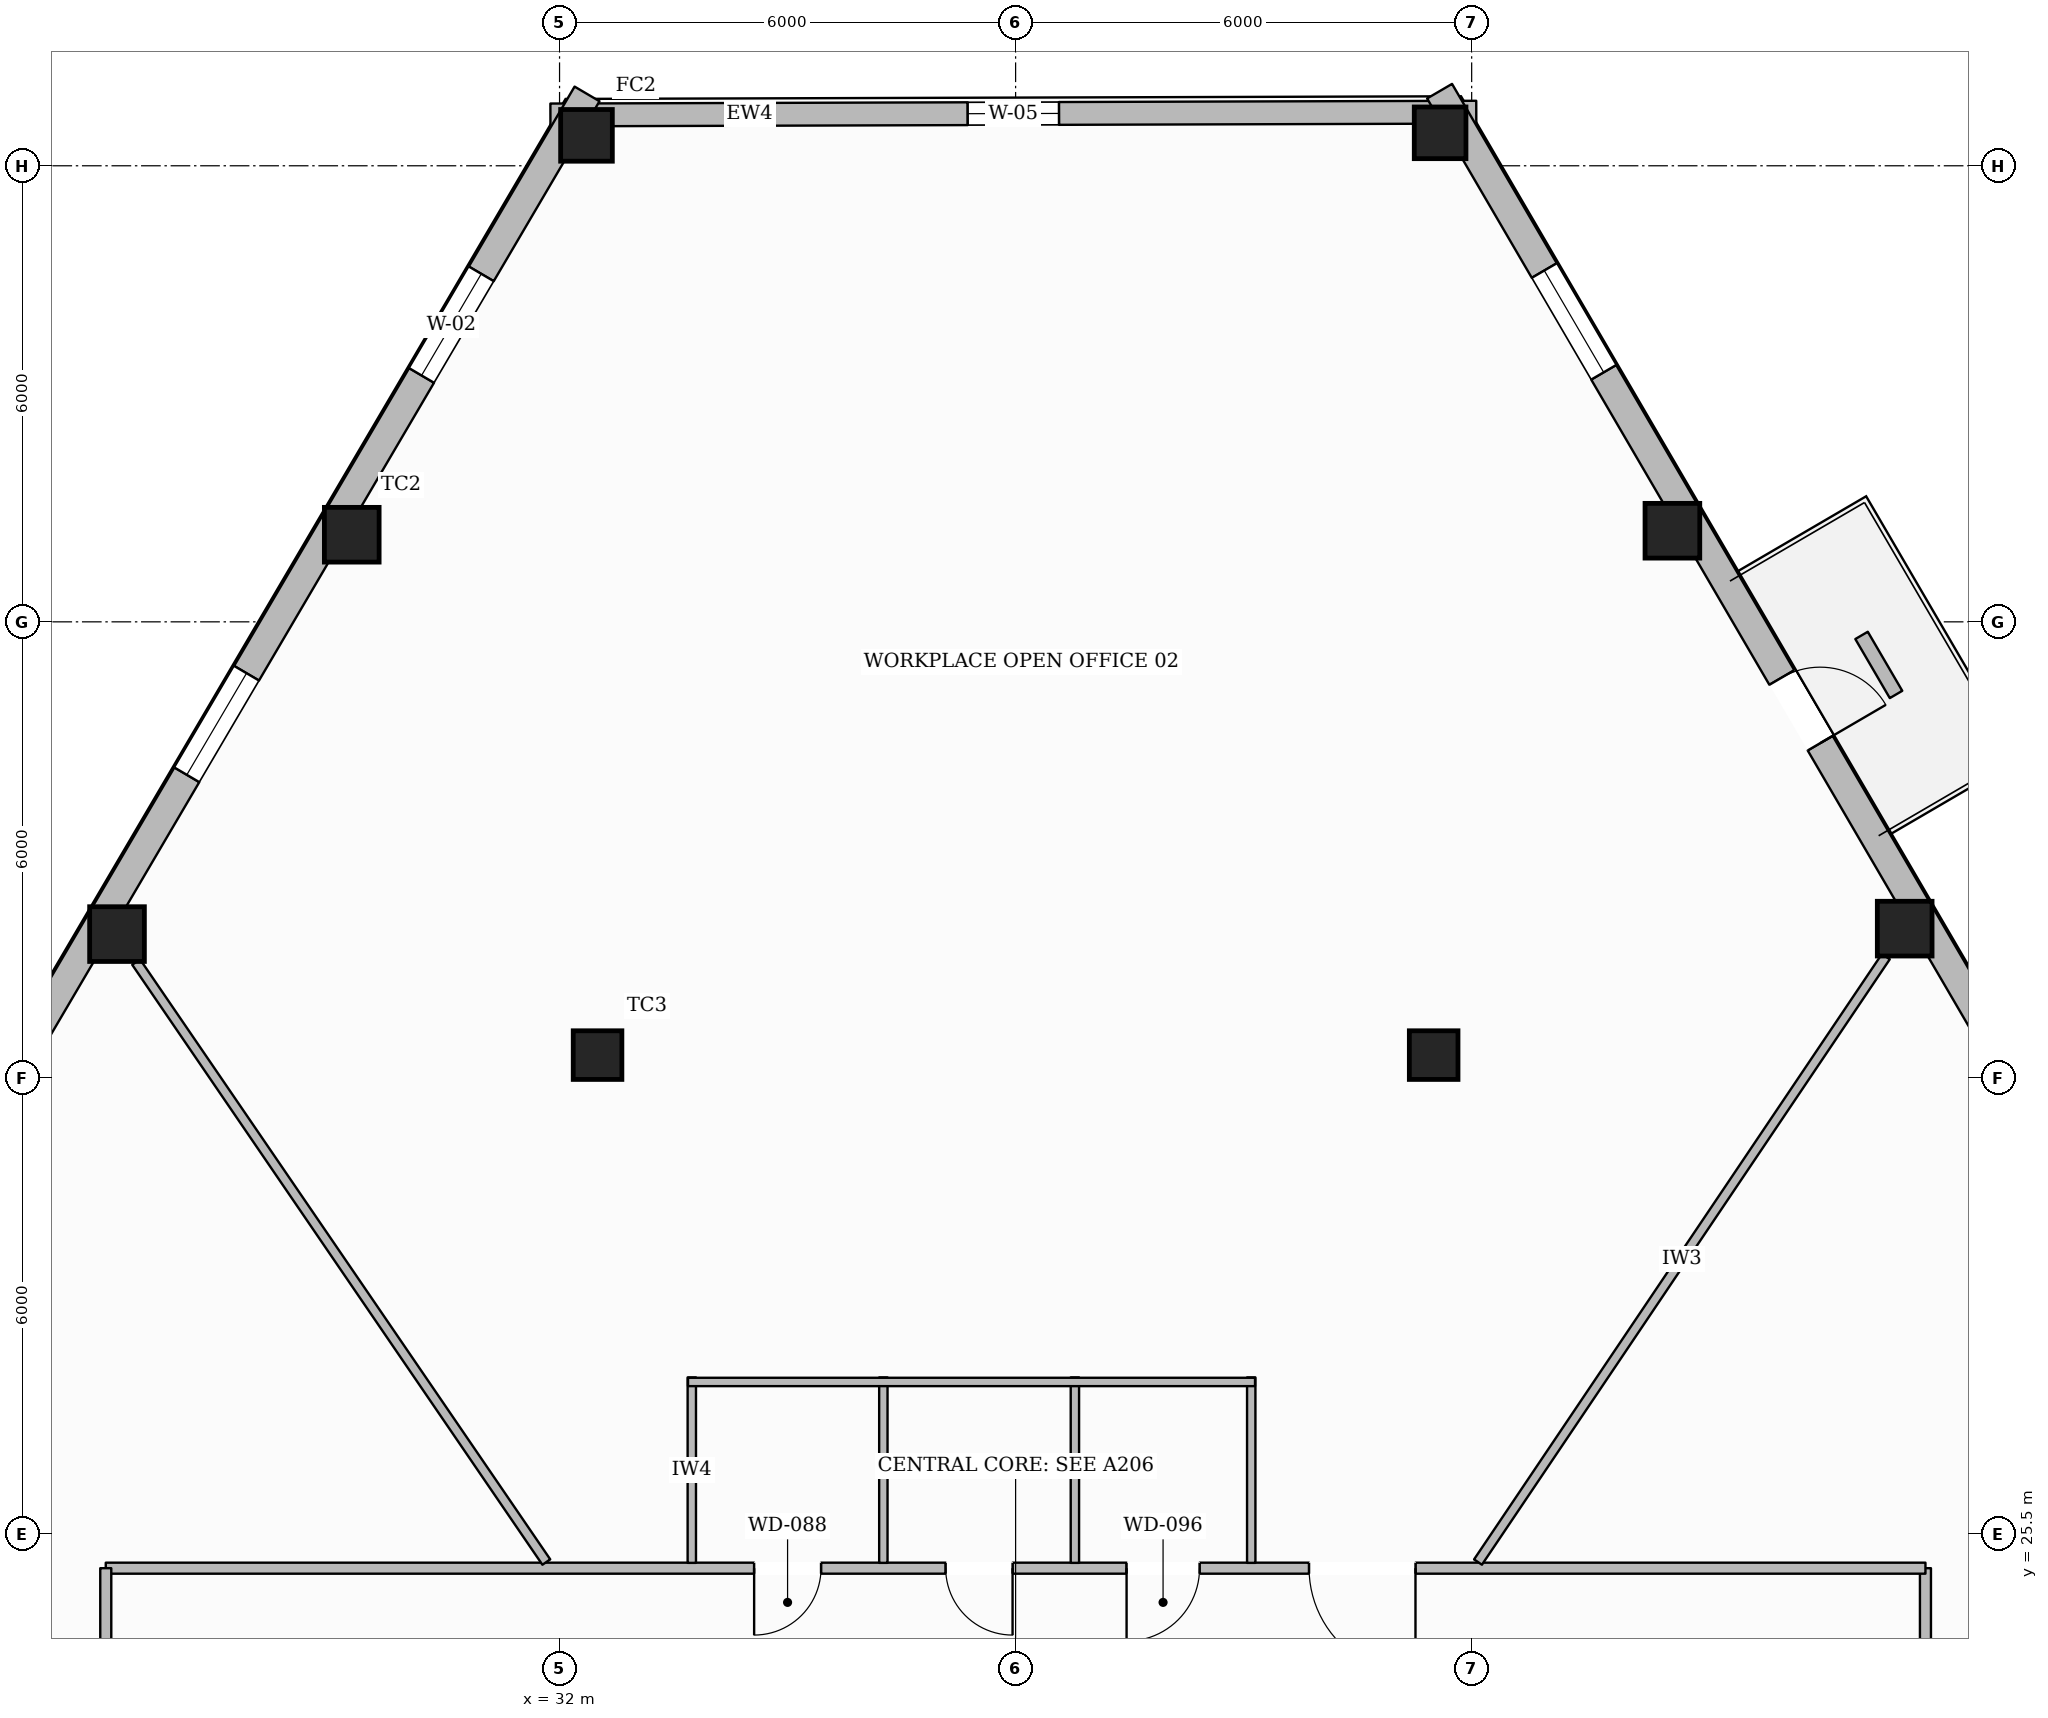
"""IFC4 building model, lengths in metres.
Left out: names, types, materials, properties, quantities, classifications, styles, units other than length and angle.
Written with IfcOpenShell. Run it as: python <this file> out.ifc"""

import sys

from ifc_helpers import new_model, si_unit, direction, frame, frame_2d, origin, origin_2d, place, context, subcontext, project, spatial, rectangle, hollow_rectangle, extrude, element, fill, save


model = new_model("IFC4")
c1 = context("Model", 3, precision=1e-05, world=origin(), true_north=direction((0.0, 1.0)))
c2 = subcontext(c1, "Body", "Model", "MODEL_VIEW")
j1 = project(units=[si_unit("LENGTHUNIT", "METRE"), si_unit("PLANEANGLEUNIT", "RADIAN")], contexts=[c1])
p1 = place(None, origin())
s1 = spatial("IfcSite", under=j1, at=p1, CompositionType="ELEMENT")
p2 = place(p1, origin())
s2 = spatial("IfcBuilding", under=s1, at=p2, CompositionType="ELEMENT")
p3 = place(p2, frame((0.0, 0.0, 135.55)))
s3 = spatial("IfcBuildingStorey", under=s2, at=p3, CompositionType="ELEMENT", Elevation=135.55)
p4 = place(p3, frame((32.354, 43.9, 0.0), z_axis=(0.0, 0.0, 1.0), x_axis=(1.0, 0.0, 0.0)))
e1 = element("IfcColumn", 1, at=p4, inside=s3, PredefinedType="COLUMN", context=c2, shape_type="SweptSolid", body=[
    extrude(hollow_rectangle(XDim=0.68, YDim=0.68, WallThickness=0.03, at=origin_2d()), origin(), (0.0, 0.0, 1.0), 3.6),
])
for number, where, z_axis, x_axis in (
    (2, (29.266, 38.646, 0.0), (0.0, 0.0, 1.0), (1.0, 0.0, 0.0)),
    (3, (26.178, 33.392, 0.0), (0.0, 0.0, 1.0), (1.0, 0.0, 0.0)),
    (4, (49.697, 33.464, 0.0), (0.0, 0.0, 1.0), (1.0, 0.0, 0.0)),
    (5, (46.641, 38.698, 0.0), (0.0, 0.0, 1.0), (1.0, 0.0, 0.0)),
):
    element("IfcColumn", number, at=place(p3, frame(where, z_axis=z_axis, x_axis=x_axis)), inside=s3, PredefinedType="COLUMN", context=c2, shape_type="SweptSolid", body=[
        extrude(hollow_rectangle(XDim=0.72, YDim=0.72, WallThickness=0.032, at=origin_2d()), origin(), (0.0, 0.0, 1.0), 3.6),
    ])
p5 = place(p3, frame((43.585, 43.934, 0.0), z_axis=(0.0, 0.0, 1.0), x_axis=(1.0, 0.0, 0.0)))
e6 = element("IfcColumn", 6, at=p5, inside=s3, PredefinedType="COLUMN", context=c2, shape_type="SweptSolid", body=[
    extrude(hollow_rectangle(XDim=0.68, YDim=0.68, WallThickness=0.03, at=origin_2d()), origin(), (0.0, 0.0, 1.0), 3.6),
])
for number, where, z_axis, x_axis in (
    (7, (32.5, 31.8, 0.0), (0.0, 0.0, 1.0), (1.0, 0.0, 0.0)),
    (8, (43.5, 31.8, 0.0), (0.0, 0.0, 1.0), (1.0, 0.0, 0.0)),
):
    element("IfcColumn", number, at=place(p3, frame(where, z_axis=z_axis, x_axis=x_axis)), inside=s3, PredefinedType="COLUMN", context=c2, shape_type="SweptSolid", body=[
        extrude(hollow_rectangle(XDim=0.64, YDim=0.64, WallThickness=0.028, at=origin_2d()), origin(), (0.0, 0.0, 1.0), 3.6),
    ])
p6 = place(p3, frame((31.88, 44.169, 0.0), z_axis=(0.0, 0.0, 1.0), x_axis=(0.999995540586, 0.002986437416, 0.0)))
e9 = element("IfcWall", 9, at=p6, inside=s3, PredefinedType="STANDARD", context=c2, shape_type="SweptSolid", body=[
    extrude(rectangle(XDim=12.181, YDim=0.3, at=frame_2d((6.09, 0.0))), origin(), (0.0, 0.0, 1.0), 3.059),
])
p7 = place(p6, frame((5.49, 0.0, 0.65)))
e10 = element("IfcOpeningElement", 10, at=p7, cuts=e9, PredefinedType="OPENING", context=c2, shape_type="SweptSolid", body=[
    extrude(rectangle(XDim=1.2, YDim=1.7, at=frame_2d((0.6, 0.85))), frame((0.0, 0.16, 0.0), z_axis=(0.0, -1.0, 0.0), x_axis=(1.0, 0.0, 0.0)), (0.0, 0.0, 1.0), 0.32),
])
p8 = place(p3, frame((13.349, 12.098, 0.0), z_axis=(0.0, 0.0, 1.0), x_axis=(0.506726076083, 0.862107118528, 0.0)))
e11 = element("IfcWall", 11, at=p8, inside=s3, PredefinedType="STANDARD", context=c2, shape_type="SweptSolid", body=[
    extrude(rectangle(XDim=37.522, YDim=0.38, at=frame_2d((18.761, 0.0))), origin(), (0.0, 0.0, 1.0), 3.059),
])
p9 = place(p8, frame((33.226, 0.0, 0.65)))
e12 = element("IfcOpeningElement", 12, at=p9, cuts=e11, PredefinedType="OPENING", context=c2, shape_type="SweptSolid", body=[
    extrude(rectangle(XDim=1.55, YDim=1.75, at=frame_2d((0.775, 0.875))), frame((0.0, 0.2, 0.0), z_axis=(0.0, -1.0, 0.0), x_axis=(1.0, 0.0, 0.0)), (0.0, 0.0, 1.0), 0.4),
])
p10 = place(p8, frame((27.131, 0.0, 0.65)))
e13 = element("IfcOpeningElement", 13, at=p10, cuts=e11, PredefinedType="OPENING", context=c2, shape_type="SweptSolid", body=[
    extrude(rectangle(XDim=1.55, YDim=1.75, at=frame_2d((0.775, 0.875))), frame((0.0, 0.2, 0.0), z_axis=(0.0, -1.0, 0.0), x_axis=(1.0, 0.0, 0.0)), (0.0, 0.0, 1.0), 0.4),
])
p11 = place(p8, frame((21.037, 0.0, 0.65)))
e14 = element("IfcOpeningElement", 14, at=p11, cuts=e11, PredefinedType="OPENING", context=c2, shape_type="SweptSolid", body=[
    extrude(rectangle(XDim=1.55, YDim=1.75, at=frame_2d((0.775, 0.875))), frame((0.0, 0.2, 0.0), z_axis=(0.0, -1.0, 0.0), x_axis=(1.0, 0.0, 0.0)), (0.0, 0.0, 1.0), 0.4),
])
p12 = place(p8, frame((8.848, 0.0, 0.65)))
e15 = element("IfcOpeningElement", 15, at=p12, cuts=e11, PredefinedType="OPENING", context=c2, shape_type="SweptSolid", body=[
    extrude(rectangle(XDim=1.55, YDim=1.75, at=frame_2d((0.775, 0.875))), frame((0.0, 0.2, 0.0), z_axis=(0.0, -1.0, 0.0), x_axis=(1.0, 0.0, 0.0)), (0.0, 0.0, 1.0), 0.4),
])
p13 = place(p8, frame((2.753, 0.0, 0.65)))
e16 = element("IfcOpeningElement", 16, at=p13, cuts=e11, PredefinedType="OPENING", context=c2, shape_type="SweptSolid", body=[
    extrude(rectangle(XDim=1.55, YDim=1.75, at=frame_2d((0.775, 0.875))), frame((0.0, 0.2, 0.0), z_axis=(0.0, -1.0, 0.0), x_axis=(1.0, 0.0, 0.0)), (0.0, 0.0, 1.0), 0.4),
])
p14 = place(p3, frame((43.578, 44.481, 0.0), z_axis=(0.0, 0.0, 1.0), x_axis=(0.504151594759, -0.863615174428, 0.0)))
e17 = element("IfcWall", 17, at=p14, inside=s3, PredefinedType="STANDARD", context=c2, shape_type="SweptSolid", body=[
    extrude(rectangle(XDim=37.328, YDim=0.38, at=frame_2d((18.664, 0.0))), origin(), (0.0, 0.0, 1.0), 3.059),
])
p15 = place(p14, frame((8.932, 0.0, 0.0)))
e18 = element("IfcOpeningElement", 18, at=p15, cuts=e17, PredefinedType="OPENING", context=c2, shape_type="SweptSolid", body=[
    extrude(rectangle(XDim=1.0, YDim=2.2, at=frame_2d((0.5, 1.1))), frame((0.0, 0.2, 0.0), z_axis=(0.0, -1.0, 0.0), x_axis=(1.0, 0.0, 0.0)), (0.0, 0.0, 1.0), 0.4),
])
p16 = place(p14, frame((33.041, 0.0, 0.65)))
e19 = element("IfcOpeningElement", 19, at=p16, cuts=e17, PredefinedType="OPENING", context=c2, shape_type="SweptSolid", body=[
    extrude(rectangle(XDim=1.55, YDim=1.75, at=frame_2d((0.775, 0.875))), frame((0.0, 0.2, 0.0), z_axis=(0.0, -1.0, 0.0), x_axis=(1.0, 0.0, 0.0)), (0.0, 0.0, 1.0), 0.4),
])
p17 = place(p14, frame((26.979, 0.0, 0.65)))
e20 = element("IfcOpeningElement", 20, at=p17, cuts=e17, PredefinedType="OPENING", context=c2, shape_type="SweptSolid", body=[
    extrude(rectangle(XDim=1.55, YDim=1.75, at=frame_2d((0.775, 0.875))), frame((0.0, 0.2, 0.0), z_axis=(0.0, -1.0, 0.0), x_axis=(1.0, 0.0, 0.0)), (0.0, 0.0, 1.0), 0.4),
])
p18 = place(p14, frame((20.917, 0.0, 0.65)))
e21 = element("IfcOpeningElement", 21, at=p18, cuts=e17, PredefinedType="OPENING", context=c2, shape_type="SweptSolid", body=[
    extrude(rectangle(XDim=1.55, YDim=1.75, at=frame_2d((0.775, 0.875))), frame((0.0, 0.2, 0.0), z_axis=(0.0, -1.0, 0.0), x_axis=(1.0, 0.0, 0.0)), (0.0, 0.0, 1.0), 0.4),
])
p19 = place(p14, frame((2.732, 0.0, 0.65)))
e22 = element("IfcOpeningElement", 22, at=p19, cuts=e17, PredefinedType="OPENING", context=c2, shape_type="SweptSolid", body=[
    extrude(rectangle(XDim=1.55, YDim=1.75, at=frame_2d((0.775, 0.875))), frame((0.0, 0.2, 0.0), z_axis=(0.0, -1.0, 0.0), x_axis=(1.0, 0.0, 0.0)), (0.0, 0.0, 1.0), 0.4),
])
p20 = place(p3, frame((49.583, 36.544, 0.0), z_axis=(0.0, 0.0, 1.0), x_axis=(-0.504208262385, 0.863582091143, 0.0)))
e23 = element("IfcWall", 23, at=p20, inside=s3, PredefinedType="USERDEFINED", context=c2, shape_type="SweptSolid", body=[
    extrude(rectangle(XDim=0.9, YDim=0.19, at=frame_2d((0.45, 0.0))), origin(), (0.0, 0.0, 1.0), 0.5),
])
p21 = place(p3, frame((49.97, 7.15, 0.0), z_axis=(0.0, 0.0, 1.0), x_axis=(0.0, 1.0, 0.0)))
e24 = element("IfcWall", 24, at=p21, inside=s3, PredefinedType="PARTITIONING", context=c2, shape_type="SweptSolid", body=[
    extrude(rectangle(XDim=17.9, YDim=0.145, at=frame_2d((8.95, 0.0))), origin(), (0.0, 0.0, 1.0), 3.288),
])
p22 = place(p21, frame((8.328, 0.0, 0.0)))
e25 = element("IfcOpeningElement", 25, at=p22, cuts=e24, PredefinedType="OPENING", context=c2, shape_type="SweptSolid", body=[
    extrude(rectangle(XDim=1.4, YDim=2.2, at=frame_2d((0.7, 1.1))), frame((0.0, 0.083, 0.0), z_axis=(0.0, -1.0, 0.0), x_axis=(1.0, 0.0, 0.0)), (0.0, 0.0, 1.0), 0.165),
])
p23 = place(p3, frame((49.97, 25.05, 0.0), z_axis=(0.0, 0.0, 1.0), x_axis=(-1.0, 0.0, 0.0)))
e26 = element("IfcWall", 26, at=p23, inside=s3, PredefinedType="PARTITIONING", context=c2, shape_type="SweptSolid", body=[
    extrude(rectangle(XDim=23.94, YDim=0.145, at=frame_2d((11.97, 0.0))), origin(), (0.0, 0.0, 1.0), 3.6),
])
p24 = place(p23, frame((14.53, 0.0, 0.0)))
e27 = element("IfcOpeningElement", 27, at=p24, cuts=e26, PredefinedType="OPENING", context=c2, shape_type="SweptSolid", body=[
    extrude(rectangle(XDim=0.88, YDim=2.1, at=frame_2d((0.44, 1.05))), frame((0.0, 0.083, 0.0), z_axis=(0.0, -1.0, 0.0), x_axis=(1.0, 0.0, 0.0)), (0.0, 0.0, 1.0), 0.165),
])
p25 = place(p23, frame((12.01, 0.0, 0.0)))
e28 = element("IfcOpeningElement", 28, at=p25, cuts=e26, PredefinedType="OPENING", context=c2, shape_type="SweptSolid", body=[
    extrude(rectangle(XDim=0.88, YDim=2.1, at=frame_2d((0.44, 1.05))), frame((0.0, 0.083, 0.0), z_axis=(0.0, -1.0, 0.0), x_axis=(1.0, 0.0, 0.0)), (0.0, 0.0, 1.0), 0.165),
])
p26 = place(p23, frame((9.55, 0.0, 0.0)))
e29 = element("IfcOpeningElement", 29, at=p26, cuts=e26, PredefinedType="OPENING", context=c2, shape_type="SweptSolid", body=[
    extrude(rectangle(XDim=0.96, YDim=2.1, at=frame_2d((0.48, 1.05))), frame((0.0, 0.083, 0.0), z_axis=(0.0, -1.0, 0.0), x_axis=(1.0, 0.0, 0.0)), (0.0, 0.0, 1.0), 0.165),
])
p27 = place(p23, frame((6.709, 0.0, 0.0)))
e30 = element("IfcOpeningElement", 30, at=p27, cuts=e26, PredefinedType="OPENING", context=c2, shape_type="SweptSolid", body=[
    extrude(rectangle(XDim=1.4, YDim=2.2, at=frame_2d((0.7, 1.1))), frame((0.0, 0.083, 0.0), z_axis=(0.0, -1.0, 0.0), x_axis=(1.0, 0.0, 0.0)), (0.0, 0.0, 1.0), 0.165),
])
p28 = place(p3, frame((26.03, 25.05, 0.0), z_axis=(0.0, 0.0, 1.0), x_axis=(0.0, -1.0, 0.0)))
e31 = element("IfcWall", 31, at=p28, inside=s3, PredefinedType="PARTITIONING", context=c2, shape_type="SweptSolid", body=[
    extrude(rectangle(XDim=17.9, YDim=0.145, at=frame_2d((8.95, 0.0))), origin(), (0.0, 0.0, 1.0), 3.288),
])
p29 = place(p28, frame((4.789, 0.0, 0.0)))
e32 = element("IfcOpeningElement", 32, at=p29, cuts=e31, PredefinedType="OPENING", context=c2, shape_type="SweptSolid", body=[
    extrude(rectangle(XDim=1.4, YDim=2.2, at=frame_2d((0.7, 1.1))), frame((0.0, 0.083, 0.0), z_axis=(0.0, -1.0, 0.0), x_axis=(1.0, 0.0, 0.0)), (0.0, 0.0, 1.0), 0.165),
])
for number, where, z_axis, x_axis in (
    (33, (33.74, 25.12, 0.0), (0.0, 0.0, 1.0), (0.0, 1.0, 0.0)),
    (34, (36.26, 25.12, 0.0), (0.0, 0.0, 1.0), (0.0, 1.0, 0.0)),
    (35, (38.78, 25.12, 0.0), (0.0, 0.0, 1.0), (0.0, 1.0, 0.0)),
    (36, (41.1, 25.12, 0.0), (0.0, 0.0, 1.0), (0.0, 1.0, 0.0)),
):
    element("IfcWall", number, at=place(p3, frame(where, z_axis=z_axis, x_axis=x_axis)), inside=s3, PredefinedType="PLUMBINGWALL", context=c2, shape_type="SweptSolid", body=[
        extrude(rectangle(XDim=2.44, YDim=0.11, at=frame_2d((1.22, 0.0))), origin(), (0.0, 0.0, 1.0), 3.6),
    ])
p30 = place(p3, frame((33.69, 27.5, 0.0), z_axis=(0.0, 0.0, 1.0), x_axis=(1.0, 0.0, 0.0)))
e37 = element("IfcWall", 37, at=p30, inside=s3, PredefinedType="PLUMBINGWALL", context=c2, shape_type="SweptSolid", body=[
    extrude(rectangle(XDim=7.46, YDim=0.11, at=frame_2d((3.73, 0.0))), origin(), (0.0, 0.0, 1.0), 3.6),
])
p31 = place(p3, frame((44.083, 25.131, 0.0), z_axis=(0.0, 0.0, 1.0), x_axis=(0.558706378993, 0.829365529832, 0.0)))
e38 = element("IfcWall", 38, at=p31, inside=s3, PredefinedType="PARTITIONING", context=c2, shape_type="SweptSolid", body=[
    extrude(rectangle(XDim=9.604, YDim=0.125, at=frame_2d((4.802, 0.0))), origin(), (0.0, 0.0, 1.0), 3.6),
])
p32 = place(p3, frame((31.826, 25.131, 0.0), z_axis=(0.0, 0.0, 1.0), x_axis=(-0.564384562589, 0.825512002039, 0.0)))
e39 = element("IfcWall", 39, at=p32, inside=s3, PredefinedType="PARTITIONING", context=c2, shape_type="SweptSolid", body=[
    extrude(rectangle(XDim=9.562, YDim=0.125, at=frame_2d((4.781, 0.0))), origin(), (0.0, 0.0, 1.0), 3.6),
])
p33 = place(p15, origin())
e40 = element("IfcDoor", 40, at=p33, inside=s3, OperationType="SINGLE_SWING_RIGHT", PredefinedType="DOOR", context=c2, shape_type="SweptSolid", body=[
    extrude(rectangle(XDim=1.0, YDim=2.2, at=frame_2d((0.5, 1.1))), frame((0.0, 0.025, 0.0), z_axis=(0.0, -1.0, 0.0), x_axis=(1.0, 0.0, 0.0)), (0.0, 0.0, 1.0), 0.05),
])
fill(e18, e40)
p34 = place(p9, origin())
e41 = element("IfcWindow", 41, at=p34, inside=s3, PartitioningType="SINGLE_PANEL", PredefinedType="WINDOW", context=c2, shape_type="SweptSolid", body=[
    extrude(rectangle(XDim=1.55, YDim=1.75, at=frame_2d((0.775, 0.875))), frame((0.0, 0.03, 0.0), z_axis=(0.0, -1.0, 0.0), x_axis=(1.0, 0.0, 0.0)), (0.0, 0.0, 1.0), 0.06),
])
fill(e12, e41)
p35 = place(p10, origin())
e42 = element("IfcWindow", 42, at=p35, inside=s3, PartitioningType="SINGLE_PANEL", PredefinedType="WINDOW", context=c2, shape_type="SweptSolid", body=[
    extrude(rectangle(XDim=1.55, YDim=1.75, at=frame_2d((0.775, 0.875))), frame((0.0, 0.03, 0.0), z_axis=(0.0, -1.0, 0.0), x_axis=(1.0, 0.0, 0.0)), (0.0, 0.0, 1.0), 0.06),
])
fill(e13, e42)
p36 = place(p19, origin())
e43 = element("IfcWindow", 43, at=p36, inside=s3, PartitioningType="SINGLE_PANEL", PredefinedType="WINDOW", context=c2, shape_type="SweptSolid", body=[
    extrude(rectangle(XDim=1.55, YDim=1.75, at=frame_2d((0.775, 0.875))), frame((0.0, 0.03, 0.0), z_axis=(0.0, -1.0, 0.0), x_axis=(1.0, 0.0, 0.0)), (0.0, 0.0, 1.0), 0.06),
])
fill(e22, e43)
p37 = place(p7, origin())
e44 = element("IfcWindow", 44, at=p37, inside=s3, PartitioningType="SINGLE_PANEL", PredefinedType="WINDOW", context=c2, shape_type="SweptSolid", body=[
    extrude(rectangle(XDim=1.2, YDim=1.7, at=frame_2d((0.6, 0.85))), frame((0.0, 0.03, 0.0), z_axis=(0.0, -1.0, 0.0), x_axis=(1.0, 0.0, 0.0)), (0.0, 0.0, 1.0), 0.06),
])
fill(e10, e44)
p38 = place(p24, origin())
e45 = element("IfcDoor", 45, at=p38, inside=s3, OperationType="SINGLE_SWING_RIGHT", PredefinedType="DOOR", context=c2, shape_type="SweptSolid", body=[
    extrude(rectangle(XDim=0.88, YDim=2.1, at=frame_2d((0.44, 1.05))), frame((0.0, 0.025, 0.0), z_axis=(0.0, -1.0, 0.0), x_axis=(1.0, 0.0, 0.0)), (0.0, 0.0, 1.0), 0.05),
])
fill(e27, e45)
p39 = place(p25, origin())
e46 = element("IfcDoor", 46, at=p39, inside=s3, OperationType="SINGLE_SWING_LEFT", PredefinedType="DOOR", context=c2, shape_type="SweptSolid", body=[
    extrude(rectangle(XDim=0.88, YDim=2.1, at=frame_2d((0.44, 1.05))), frame((0.0, 0.025, 0.0), z_axis=(0.0, -1.0, 0.0), x_axis=(1.0, 0.0, 0.0)), (0.0, 0.0, 1.0), 0.05),
])
fill(e28, e46)
p40 = place(p26, origin())
e47 = element("IfcDoor", 47, at=p40, inside=s3, OperationType="SINGLE_SWING_RIGHT", PredefinedType="DOOR", context=c2, shape_type="SweptSolid", body=[
    extrude(rectangle(XDim=0.96, YDim=2.1, at=frame_2d((0.48, 1.05))), frame((0.0, 0.025, 0.0), z_axis=(0.0, -1.0, 0.0), x_axis=(1.0, 0.0, 0.0)), (0.0, 0.0, 1.0), 0.05),
])
fill(e29, e47)
p41 = place(p27, origin())
e48 = element("IfcDoor", 48, at=p41, inside=s3, OperationType="SINGLE_SWING_LEFT", PredefinedType="DOOR", context=c2, shape_type="SweptSolid", body=[
    extrude(rectangle(XDim=1.4, YDim=2.2, at=frame_2d((0.7, 1.1))), frame((0.0, 0.025, 0.0), z_axis=(0.0, -1.0, 0.0), x_axis=(1.0, 0.0, 0.0)), (0.0, 0.0, 1.0), 0.05),
])
fill(e30, e48)
save(model, sys.argv[1])
